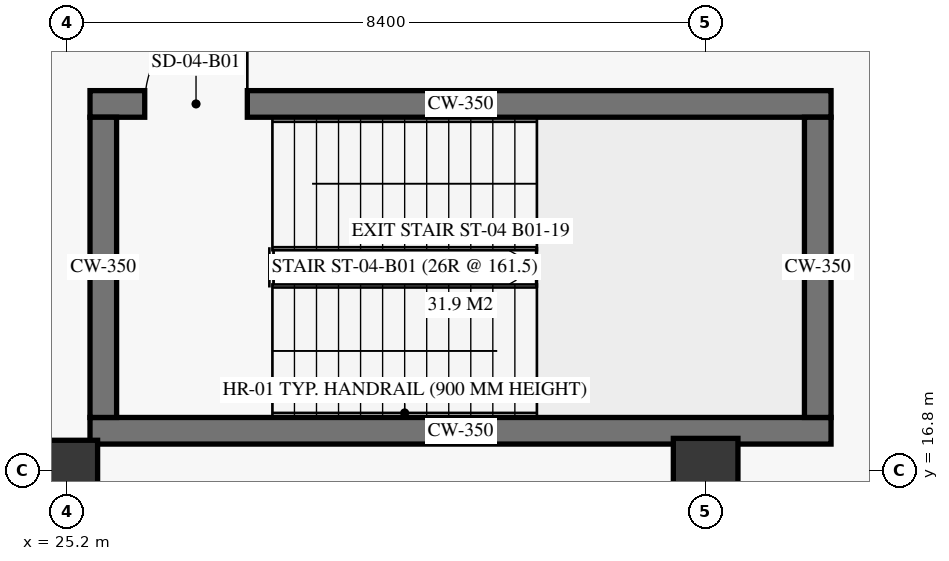
"""IFC4 building model, lengths in metres.
Left out: names, types, materials, properties, quantities, classifications, styles, units other than length and angle.
Written with IfcOpenShell. Run it as: python <this file> out.ifc"""

import sys

from ifc_helpers import new_model, si_unit, direction, frame, frame_2d, origin, origin_2d, place, context, subcontext, project, spatial, rectangle, extrude, element, fill, save


model = new_model("IFC4")
c1 = context("Model", 3, precision=1e-05, world=origin(), true_north=direction((0.0, 1.0)))
c2 = subcontext(c1, "Body", "Model", "MODEL_VIEW")
j1 = project(units=[si_unit("LENGTHUNIT", "METRE"), si_unit("PLANEANGLEUNIT", "RADIAN")], contexts=[c1])
p1 = place(None, origin())
s1 = spatial("IfcSite", under=j1, at=p1, CompositionType="ELEMENT")
p2 = place(p1, origin())
s2 = spatial("IfcBuilding", under=s1, at=p2, CompositionType="ELEMENT")
p3 = place(p2, frame((0.0, 0.0, -4.2)))
s3 = spatial("IfcBuildingStorey", under=s2, at=p3, CompositionType="ELEMENT", Elevation=-4.2)
p4 = place(p3, frame((25.2, 16.8, 0.0), z_axis=(0.0, 0.0, 1.0), x_axis=(1.0, 0.0, 0.0)))
e1 = element("IfcColumn", 1, at=p4, inside=s3, PredefinedType="COLUMN", context=c2, shape_type="SweptSolid", body=[
    extrude(rectangle(XDim=0.8, YDim=0.8, at=origin_2d()), origin(), (0.0, 0.0, 1.0), 3.88),
])
p5 = place(p3, frame((33.6, 16.8, 0.0), z_axis=(0.0, 0.0, 1.0), x_axis=(1.0, 0.0, 0.0)))
e2 = element("IfcColumn", 2, at=p5, inside=s3, PredefinedType="COLUMN", context=c2, shape_type="SweptSolid", body=[
    extrude(rectangle(XDim=0.85, YDim=0.85, at=origin_2d()), origin(), (0.0, 0.0, 1.0), 3.88),
])
p6 = place(p3, frame((25.5, 17.325, 0.0), z_axis=(0.0, 0.0, 1.0), x_axis=(1.0, 0.0, 0.0)))
e3 = element("IfcWall", 3, at=p6, inside=s3, PredefinedType="SHEAR", context=c2, shape_type="SweptSolid", body=[
    extrude(rectangle(XDim=9.75, YDim=0.35, at=frame_2d((4.875, 0.0))), origin(), (0.0, 0.0, 1.0), 3.88),
])
p7 = place(p3, frame((25.5, 21.625, 0.0), z_axis=(0.0, 0.0, 1.0), x_axis=(1.0, 0.0, 0.0)))
e4 = element("IfcWall", 4, at=p7, inside=s3, PredefinedType="SHEAR", context=c2, shape_type="SweptSolid", body=[
    extrude(rectangle(XDim=9.75, YDim=0.35, at=frame_2d((4.875, 0.0))), origin(), (0.0, 0.0, 1.0), 3.88),
])
p8 = place(p7, frame((0.72, 0.0, 0.0)))
e5 = element("IfcOpeningElement", 5, at=p8, cuts=e4, PredefinedType="OPENING", context=c2, shape_type="SweptSolid", body=[
    extrude(rectangle(XDim=1.35, YDim=2.25, at=frame_2d((0.675, 1.125))), frame((0.0, 0.185, 0.0), z_axis=(0.0, -1.0, 0.0), x_axis=(1.0, 0.0, 0.0)), (0.0, 0.0, 1.0), 0.37),
])
for number, where, z_axis, x_axis in (
    (6, (25.675, 17.5, 0.0), (0.0, 0.0, 1.0), (0.0, 1.0, 0.0)),
    (7, (35.075, 17.5, 0.0), (0.0, 0.0, 1.0), (0.0, 1.0, 0.0)),
):
    element("IfcWall", number, at=place(p3, frame(where, z_axis=z_axis, x_axis=x_axis)), inside=s3, PredefinedType="SHEAR", context=c2, shape_type="SweptSolid", body=[
        extrude(rectangle(XDim=3.95, YDim=0.35, at=frame_2d((1.975, 0.0))), origin(), (0.0, 0.0, 1.0), 3.88),
    ])
p9 = place(p8, origin())
e8 = element("IfcDoor", 8, at=p9, inside=s3, OperationType="SINGLE_SWING_RIGHT", PredefinedType="DOOR", context=c2, shape_type="SweptSolid", body=[
    extrude(rectangle(XDim=1.35, YDim=2.25, at=frame_2d((0.675, 1.125))), frame((0.0, 0.025, 0.0), z_axis=(0.0, -1.0, 0.0), x_axis=(1.0, 0.0, 0.0)), (0.0, 0.0, 1.0), 0.05),
])
fill(e5, e8)
save(model, sys.argv[1])
